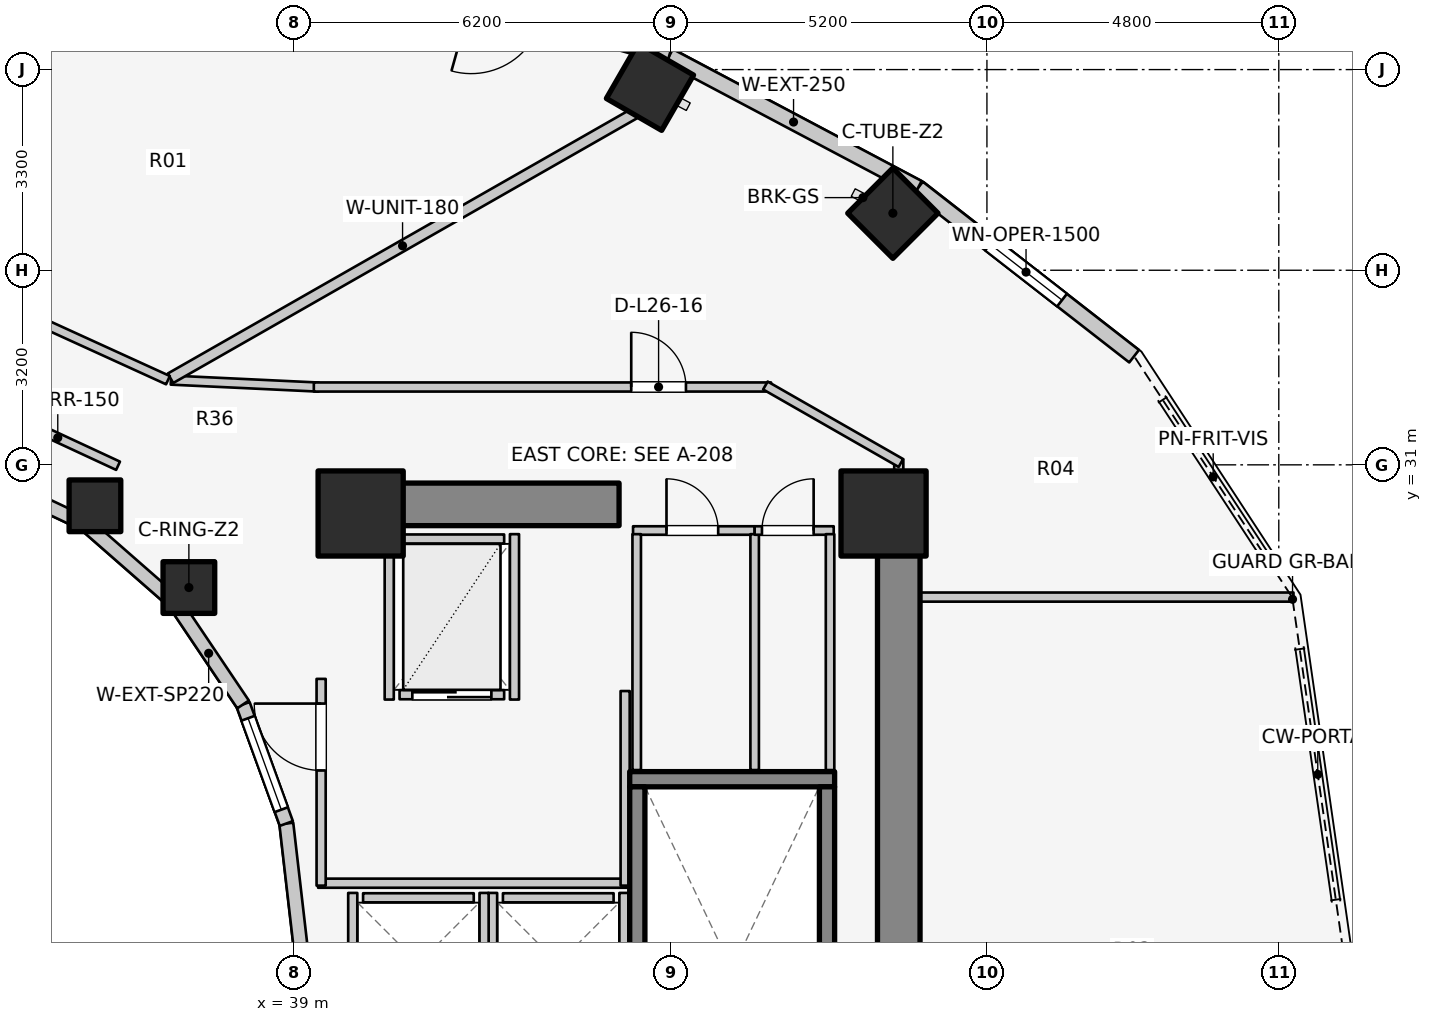
"""IFC4 building model, lengths in metres.
Left out: names, types, materials, properties, quantities, classifications, styles, units other than length and angle.
Written with IfcOpenShell. Run it as: python <this file> out.ifc"""

import sys

from ifc_helpers import new_model, si_unit, direction, frame, frame_2d, origin, origin_2d, place, context, subcontext, project, spatial, rectangle, extrude, element, fill, save


model = new_model("IFC4")
c1 = context("Model", 3, precision=1e-05, world=origin(), true_north=direction((0.0, 1.0)))
c2 = subcontext(c1, "Body", "Model", "MODEL_VIEW")
j1 = project(units=[si_unit("LENGTHUNIT", "METRE"), si_unit("PLANEANGLEUNIT", "RADIAN")], contexts=[c1])
p1 = place(None, origin())
s1 = spatial("IfcSite", under=j1, at=p1, CompositionType="ELEMENT")
p2 = place(p1, origin())
s2 = spatial("IfcBuilding", under=s1, at=p2, CompositionType="ELEMENT")
p3 = place(p2, frame((0.0, 0.0, 88.7)))
s3 = spatial("IfcBuildingStorey", under=s2, at=p3, CompositionType="ELEMENT", Elevation=88.7)
p4 = place(p3, frame((48.95, 17.05, 0.0), z_axis=(0.0, 0.0, 1.0), x_axis=(0.0, 1.0, 0.0)))
e1 = element("IfcWall", 1, at=p4, inside=s3, PredefinedType="SHEAR", context=c2, shape_type="SweptSolid", body=[
    extrude(rectangle(XDim=12.8, YDim=0.7, at=frame_2d((6.4, 0.0))), origin(), (0.0, 0.0, 1.0), 3.1),
])
p5 = place(p3, frame((39.85, 30.35, 0.0), z_axis=(0.0, 0.0, 1.0), x_axis=(1.0, 0.0, 0.0)))
e2 = element("IfcWall", 2, at=p5, inside=s3, PredefinedType="SHEAR", context=c2, shape_type="SweptSolid", body=[
    extrude(rectangle(XDim=4.5, YDim=0.7, at=frame_2d((2.25, 0.0))), origin(), (0.0, 0.0, 1.0), 3.1),
])
p6 = place(p3, frame((44.525, 25.83, 0.0), z_axis=(0.0, 0.0, 1.0), x_axis=(1.0, 0.0, 0.0)))
e3 = element("IfcWall", 3, at=p6, inside=s3, PredefinedType="SOLIDWALL", context=c2, shape_type="SweptSolid", body=[
    extrude(rectangle(XDim=3.37, YDim=0.25, at=frame_2d((1.685, 0.0))), origin(), (0.0, 0.0, 1.0), 3.1),
])
for number, where, z_axis, x_axis in (
    (4, (44.65, 17.895, 0.0), (0.0, 0.0, 1.0), (0.0, 1.0, 0.0)),
    (5, (47.77, 17.895, 0.0), (0.0, 0.0, 1.0), (0.0, 1.0, 0.0)),
):
    element("IfcWall", number, at=place(p3, frame(where, z_axis=z_axis, x_axis=x_axis)), inside=s3, PredefinedType="SOLIDWALL", context=c2, shape_type="SweptSolid", body=[
        extrude(rectangle(XDim=7.81, YDim=0.25, at=frame_2d((3.905, 0.0))), origin(), (0.0, 0.0, 1.0), 3.1),
    ])
for number, where, z_axis, x_axis in (
    (6, (48.7, 30.2, 0.0), (0.0, 0.0, 1.0), (1.0, 0.0, 0.0)),
    (7, (40.1, 30.2, 0.0), (0.0, 0.0, 1.0), (1.0, 0.0, 0.0)),
):
    element("IfcColumn", number, at=place(p3, frame(where, z_axis=z_axis, x_axis=x_axis)), inside=s3, PredefinedType="COLUMN", context=c2, shape_type="SweptSolid", body=[
        extrude(rectangle(XDim=1.4, YDim=1.4, at=origin_2d()), origin(), (0.0, 0.0, 1.0), 3.1),
    ])
p7 = place(p3, frame((37.275, 28.982, 0.0), z_axis=(0.0, 0.0, 1.0), x_axis=(1.0, 0.0, 0.0)))
e8 = element("IfcColumn", 8, at=p7, inside=s3, PredefinedType="COLUMN", context=c2, shape_type="SweptSolid", body=[
    extrude(rectangle(XDim=0.85, YDim=0.85, at=origin_2d()), origin(), (0.0, 0.0, 1.0), 3.1),
])
p8 = place(p3, frame((48.853, 35.138, 0.0), z_axis=(0.0, 0.0, 1.0), x_axis=(0.707106781187, 0.707106781187, 0.0)))
e9 = element("IfcColumn", 9, at=p8, inside=s3, PredefinedType="COLUMN", context=c2, shape_type="SweptSolid", body=[
    extrude(rectangle(XDim=1.05, YDim=1.05, at=origin_2d()), origin(), (0.0, 0.0, 1.0), 3.1),
])
p9 = place(p3, frame((35.73, 30.327, 0.0), z_axis=(0.0, 0.0, 1.0), x_axis=(1.0, 0.0, 0.0)))
e10 = element("IfcColumn", 10, at=p9, inside=s3, PredefinedType="COLUMN", context=c2, shape_type="SweptSolid", body=[
    extrude(rectangle(XDim=0.85, YDim=0.85, at=origin_2d()), origin(), (0.0, 0.0, 1.0), 3.1),
])
p10 = place(p3, frame((44.858, 37.218, 0.0), z_axis=(0.0, 0.0, 1.0), x_axis=(0.5, 0.866025403784, 0.0)))
e11 = element("IfcColumn", 11, at=p10, inside=s3, PredefinedType="COLUMN", context=c2, shape_type="SweptSolid", body=[
    extrude(rectangle(XDim=1.05, YDim=1.05, at=origin_2d()), origin(), (0.0, 0.0, 1.0), 3.1),
])
p11 = place(p3, frame((39.12, 23.0, 0.0), z_axis=(0.0, 0.0, 1.0), x_axis=(-0.114711713601, 0.993398823617, 0.0)))
e12 = element("IfcWall", 12, at=p11, inside=s3, PredefinedType="STANDARD", context=c2, shape_type="SweptSolid", body=[
    extrude(rectangle(XDim=2.115, YDim=0.23, at=frame_2d((1.058, 0.0))), origin(), (0.0, 0.0, 1.0), 2.84),
])
p12 = place(p3, frame((38.877, 25.102, 0.0), z_axis=(0.0, 0.0, 1.0), x_axis=(-0.341423187295, 0.93990968033, 0.0)))
e13 = element("IfcWall", 13, at=p12, inside=s3, PredefinedType="STANDARD", context=c2, shape_type="SweptSolid", body=[
    extrude(rectangle(XDim=2.084, YDim=0.23, at=frame_2d((1.042, 0.0))), origin(), (0.0, 0.0, 1.0), 2.84),
])
p13 = place(p12, frame((0.242, 0.0, 0.85)))
e14 = element("IfcOpeningElement", 14, at=p13, cuts=e13, PredefinedType="OPENING", context=c2, shape_type="SweptSolid", body=[
    extrude(rectangle(XDim=1.6, YDim=1.65, at=frame_2d((0.8, 0.825))), frame((0.0, 0.125, 0.0), z_axis=(0.0, -1.0, 0.0), x_axis=(1.0, 0.0, 0.0)), (0.0, 0.0, 1.0), 0.25),
])
p14 = place(p3, frame((38.166, 27.06, 0.0), z_axis=(0.0, 0.0, 1.0), x_axis=(-0.558197800898, 0.829707909492, 0.0)))
e15 = element("IfcWall", 15, at=p14, inside=s3, PredefinedType="STANDARD", context=c2, shape_type="SweptSolid", body=[
    extrude(rectangle(XDim=2.027, YDim=0.23, at=frame_2d((1.013, 0.0))), origin(), (0.0, 0.0, 1.0), 2.16),
])
p15 = place(p3, frame((37.035, 28.742, 0.0), z_axis=(0.0, 0.0, 1.0), x_axis=(-0.752576694707, 0.658504607869, 0.0)))
e16 = element("IfcWall", 16, at=p15, inside=s3, PredefinedType="STANDARD", context=c2, shape_type="SweptSolid", body=[
    extrude(rectangle(XDim=1.959, YDim=0.23, at=frame_2d((0.98, 0.0))), origin(), (0.0, 0.0, 1.0), 2.16),
])
p16 = place(p3, frame((35.56, 30.032, 0.0), z_axis=(0.0, 0.0, 1.0), x_axis=(-0.904179699603, 0.427152280606, 0.0)))
e17 = element("IfcWall", 17, at=p16, inside=s3, PredefinedType="STANDARD", context=c2, shape_type="SweptSolid", body=[
    extrude(rectangle(XDim=1.899, YDim=0.23, at=frame_2d((0.95, 0.0))), origin(), (0.0, 0.0, 1.0), 2.16),
])
p17 = place(p3, frame((52.821, 32.786, 0.0), z_axis=(0.0, 0.0, 1.0), x_axis=(-0.789127449954, 0.614229491094, 0.0)))
e18 = element("IfcWall", 18, at=p17, inside=s3, PredefinedType="STANDARD", context=c2, shape_type="SweptSolid", body=[
    extrude(rectangle(XDim=4.505, YDim=0.26, at=frame_2d((2.252, 0.0))), origin(), (0.0, 0.0, 1.0), 2.85),
])
p18 = place(p17, frame((1.502, 0.0, 0.75)))
e19 = element("IfcOpeningElement", 19, at=p18, cuts=e18, PredefinedType="OPENING", context=c2, shape_type="SweptSolid", body=[
    extrude(rectangle(XDim=1.5, YDim=1.6, at=frame_2d((0.75, 0.8))), frame((0.0, 0.14, 0.0), z_axis=(0.0, -1.0, 0.0), x_axis=(1.0, 0.0, 0.0)), (0.0, 0.0, 1.0), 0.28),
])
p19 = place(p3, frame((49.266, 35.553, 0.0), z_axis=(0.0, 0.0, 1.0), x_axis=(-0.883668636807, 0.4681129568, 0.0)))
e20 = element("IfcWall", 20, at=p19, inside=s3, PredefinedType="STANDARD", context=c2, shape_type="SweptSolid", body=[
    extrude(rectangle(XDim=4.631, YDim=0.26, at=frame_2d((2.316, 0.0))), origin(), (0.0, 0.0, 1.0), 2.85),
])
p20 = place(p3, frame((45.173, 37.721, 0.0), z_axis=(0.0, 0.0, 1.0), x_axis=(-0.962938491413, 0.269721081407, 0.0)))
e21 = element("IfcWall", 21, at=p20, inside=s3, PredefinedType="STANDARD", context=c2, shape_type="SweptSolid", body=[
    extrude(rectangle(XDim=5.563, YDim=0.26, at=frame_2d((2.782, 0.0))), origin(), (0.0, 0.0, 1.0), 2.88),
])
p21 = place(p20, frame((2.182, 0.0, 0.0)))
e22 = element("IfcOpeningElement", 22, at=p21, cuts=e21, PredefinedType="OPENING", context=c2, shape_type="SweptSolid", body=[
    extrude(rectangle(XDim=1.2, YDim=2.2, at=frame_2d((0.6, 1.1))), frame((0.0, 0.14, 0.0), z_axis=(0.0, -1.0, 0.0), x_axis=(1.0, 0.0, 0.0)), (0.0, 0.0, 1.0), 0.28),
])
p22 = place(p3, frame((42.44, 23.88, 0.0), z_axis=(0.0, 0.0, 1.0), x_axis=(1.0, 0.0, 0.0)))
e23 = element("IfcWall", 23, at=p22, inside=s3, PredefinedType="SOLIDWALL", context=c2, shape_type="SweptSolid", body=[
    extrude(rectangle(XDim=1.82, YDim=0.15, at=frame_2d((0.91, 0.0))), origin(), (0.0, 0.0, 1.0), 2.855),
])
for number, where, z_axis, x_axis in (
    (24, (42.27, 21.64, 0.0), (0.0, 0.0, 1.0), (0.0, 1.0, 0.0)),
    (25, (44.43, 21.64, 0.0), (0.0, 0.0, 1.0), (0.0, 1.0, 0.0)),
):
    element("IfcWall", number, at=place(p3, frame(where, z_axis=z_axis, x_axis=x_axis)), inside=s3, PredefinedType="SOLIDWALL", context=c2, shape_type="SweptSolid", body=[
        extrude(rectangle(XDim=2.32, YDim=0.15, at=frame_2d((1.16, 0.0))), origin(), (0.0, 0.0, 1.0), 2.855),
    ])
p23 = place(p3, frame((40.14, 23.88, 0.0), z_axis=(0.0, 0.0, 1.0), x_axis=(1.0, 0.0, 0.0)))
e26 = element("IfcWall", 26, at=p23, inside=s3, PredefinedType="SOLIDWALL", context=c2, shape_type="SweptSolid", body=[
    extrude(rectangle(XDim=1.82, YDim=0.15, at=frame_2d((0.91, 0.0))), origin(), (0.0, 0.0, 1.0), 2.12),
])
p24 = place(p3, frame((39.97, 21.64, 0.0), z_axis=(0.0, 0.0, 1.0), x_axis=(0.0, 1.0, 0.0)))
e27 = element("IfcWall", 27, at=p24, inside=s3, PredefinedType="SOLIDWALL", context=c2, shape_type="SweptSolid", body=[
    extrude(rectangle(XDim=2.32, YDim=0.15, at=frame_2d((1.16, 0.0))), origin(), (0.0, 0.0, 1.0), 2.12),
])
p25 = place(p3, frame((42.13, 21.64, 0.0), z_axis=(0.0, 0.0, 1.0), x_axis=(0.0, 1.0, 0.0)))
e28 = element("IfcWall", 28, at=p25, inside=s3, PredefinedType="SOLIDWALL", context=c2, shape_type="SweptSolid", body=[
    extrude(rectangle(XDim=2.32, YDim=0.15, at=frame_2d((1.16, 0.0))), origin(), (0.0, 0.0, 1.0), 2.855),
])
p26 = place(p3, frame((40.74, 27.22, 0.0), z_axis=(0.0, 0.0, 1.0), x_axis=(1.0, 0.0, 0.0)))
e29 = element("IfcWall", 29, at=p26, inside=s3, PredefinedType="SOLIDWALL", context=c2, shape_type="SweptSolid", body=[
    extrude(rectangle(XDim=1.72, YDim=0.15, at=frame_2d((0.86, 0.0))), origin(), (0.0, 0.0, 1.0), 2.855),
])
p27 = place(p26, frame((0.21, 0.0, 0.0)))
e30 = element("IfcOpeningElement", 30, at=p27, cuts=e29, PredefinedType="OPENING", context=c2, shape_type="SweptSolid", body=[
    extrude(rectangle(XDim=1.3, YDim=2.1, at=frame_2d((0.65, 1.05))), frame((0.0, 0.085, 0.0), z_axis=(0.0, -1.0, 0.0), x_axis=(1.0, 0.0, 0.0)), (0.0, 0.0, 1.0), 0.17),
])
p28 = place(p3, frame((40.74, 29.78, 0.0), z_axis=(0.0, 0.0, 1.0), x_axis=(1.0, 0.0, 0.0)))
e31 = element("IfcWall", 31, at=p28, inside=s3, PredefinedType="SOLIDWALL", context=c2, shape_type="SweptSolid", body=[
    extrude(rectangle(XDim=1.72, YDim=0.15, at=frame_2d((0.86, 0.0))), origin(), (0.0, 0.0, 1.0), 2.855),
])
for number, where, z_axis, x_axis in (
    (32, (40.57, 27.14, 0.0), (0.0, 0.0, 1.0), (0.0, 1.0, 0.0)),
    (33, (42.63, 27.14, 0.0), (0.0, 0.0, 1.0), (0.0, 1.0, 0.0)),
):
    element("IfcWall", number, at=place(p3, frame(where, z_axis=z_axis, x_axis=x_axis)), inside=s3, PredefinedType="SOLIDWALL", context=c2, shape_type="SweptSolid", body=[
        extrude(rectangle(XDim=2.72, YDim=0.15, at=frame_2d((1.36, 0.0))), origin(), (0.0, 0.0, 1.0), 2.855),
    ])
p29 = place(p3, frame((39.4, 24.12, 0.0), z_axis=(0.0, 0.0, 1.0), x_axis=(1.0, 0.0, 0.0)))
e34 = element("IfcWall", 34, at=p29, inside=s3, PredefinedType="PARTITIONING", context=c2, shape_type="SweptSolid", body=[
    extrude(rectangle(XDim=5.08, YDim=0.15, at=frame_2d((2.54, 0.0))), origin(), (0.0, 0.0, 1.0), 2.12),
])
p30 = place(p3, frame((44.45, 24.08, 0.0), z_axis=(0.0, 0.0, 1.0), x_axis=(0.0, 1.0, 0.0)))
e35 = element("IfcWall", 35, at=p30, inside=s3, PredefinedType="PARTITIONING", context=c2, shape_type="SweptSolid", body=[
    extrude(rectangle(XDim=3.2, YDim=0.15, at=frame_2d((1.6, 0.0))), origin(), (0.0, 0.0, 1.0), 2.855),
])
p31 = place(p3, frame((39.45, 24.08, 0.0), z_axis=(0.0, 0.0, 1.0), x_axis=(0.0, 1.0, 0.0)))
e36 = element("IfcWall", 36, at=p31, inside=s3, PredefinedType="PARTITIONING", context=c2, shape_type="SweptSolid", body=[
    extrude(rectangle(XDim=3.4, YDim=0.15, at=frame_2d((1.7, 0.0))), origin(), (0.0, 0.0, 1.0), 2.855),
])
p32 = place(p31, frame((1.894, 0.0, 0.0)))
e37 = element("IfcOpeningElement", 37, at=p32, cuts=e36, PredefinedType="OPENING", context=c2, shape_type="SweptSolid", body=[
    extrude(rectangle(XDim=1.1, YDim=2.1, at=frame_2d((0.55, 1.05))), frame((0.0, 0.085, 0.0), z_axis=(0.0, -1.0, 0.0), x_axis=(1.0, 0.0, 0.0)), (0.0, 0.0, 1.0), 0.17),
])
p33 = place(p3, frame((44.58, 29.92, 0.0), z_axis=(0.0, 0.0, 1.0), x_axis=(1.0, 0.0, 0.0)))
e38 = element("IfcWall", 38, at=p33, inside=s3, PredefinedType="PLUMBINGWALL", context=c2, shape_type="SweptSolid", body=[
    extrude(rectangle(XDim=2.0, YDim=0.14, at=frame_2d((1.0, 0.0))), origin(), (0.0, 0.0, 1.0), 2.855),
])
p34 = place(p33, frame((0.55, 0.0, 0.0)))
e39 = element("IfcOpeningElement", 39, at=p34, cuts=e38, PredefinedType="OPENING", context=c2, shape_type="SweptSolid", body=[
    extrude(rectangle(XDim=0.85, YDim=2.05, at=frame_2d((0.425, 1.025))), frame((0.0, 0.08, 0.0), z_axis=(0.0, -1.0, 0.0), x_axis=(1.0, 0.0, 0.0)), (0.0, 0.0, 1.0), 0.16),
])
for number, where, z_axis, x_axis in (
    (40, (44.64, 25.98, 0.0), (0.0, 0.0, 1.0), (0.0, 1.0, 0.0)),
    (41, (46.58, 25.98, 0.0), (0.0, 0.0, 1.0), (0.0, 1.0, 0.0)),
):
    element("IfcWall", number, at=place(p3, frame(where, z_axis=z_axis, x_axis=x_axis)), inside=s3, PredefinedType="PLUMBINGWALL", context=c2, shape_type="SweptSolid", body=[
        extrude(rectangle(XDim=3.88, YDim=0.14, at=frame_2d((1.94, 0.0))), origin(), (0.0, 0.0, 1.0), 2.855),
    ])
p35 = place(p3, frame((46.58, 29.92, 0.0), z_axis=(0.0, 0.0, 1.0), x_axis=(1.0, 0.0, 0.0)))
e42 = element("IfcWall", 42, at=p35, inside=s3, PredefinedType="PLUMBINGWALL", context=c2, shape_type="SweptSolid", body=[
    extrude(rectangle(XDim=1.3, YDim=0.14, at=frame_2d((0.65, 0.0))), origin(), (0.0, 0.0, 1.0), 2.855),
])
p36 = place(p35, frame((0.12, 0.0, 0.0)))
e43 = element("IfcOpeningElement", 43, at=p36, cuts=e42, PredefinedType="OPENING", context=c2, shape_type="SweptSolid", body=[
    extrude(rectangle(XDim=0.85, YDim=2.05, at=frame_2d((0.425, 1.025))), frame((0.0, 0.08, 0.0), z_axis=(0.0, -1.0, 0.0), x_axis=(1.0, 0.0, 0.0)), (0.0, 0.0, 1.0), 0.16),
])
p37 = place(p3, frame((47.82, 25.98, 0.0), z_axis=(0.0, 0.0, 1.0), x_axis=(0.0, 1.0, 0.0)))
e44 = element("IfcWall", 44, at=p37, inside=s3, PredefinedType="PLUMBINGWALL", context=c2, shape_type="SweptSolid", body=[
    extrude(rectangle(XDim=3.88, YDim=0.14, at=frame_2d((1.94, 0.0))), origin(), (0.0, 0.0, 1.0), 2.855),
])
p38 = place(p3, frame((36.11, 30.985, 0.0), z_axis=(0.0, 0.0, 1.0), x_axis=(-0.906943449489, 0.421252393975, 0.0)))
e45 = element("IfcWall", 45, at=p38, inside=s3, PredefinedType="PARTITIONING", context=c2, shape_type="SweptSolid", body=[
    extrude(rectangle(XDim=2.186, YDim=0.15, at=frame_2d((1.093, 0.0))), origin(), (0.0, 0.0, 1.0), 2.272),
])
p39 = place(p3, frame((48.95, 28.825, 0.0), z_axis=(0.0, 0.0, 1.0), x_axis=(1.0, 0.0, 0.0)))
e46 = element("IfcWall", 46, at=p39, inside=s3, PredefinedType="PARTITIONING", context=c2, shape_type="SweptSolid", body=[
    extrude(rectangle(XDim=6.492, YDim=0.15, at=frame_2d((3.246, 0.0))), origin(), (0.0, 0.0, 1.0), 2.855),
])
p40 = place(p3, frame((48.95, 29.8, 0.0), z_axis=(0.0, 0.0, 1.0), x_axis=(0.0, 1.0, 0.0)))
e47 = element("IfcWall", 47, at=p40, inside=s3, PredefinedType="PARTITIONING", context=c2, shape_type="SweptSolid", body=[
    extrude(rectangle(XDim=1.29, YDim=0.15, at=frame_2d((0.645, 0.0))), origin(), (0.0, 0.0, 1.0), 2.142),
])
p41 = place(p3, frame((36.98, 32.394, 0.0), z_axis=(0.0, 0.0, 1.0), x_axis=(0.998877427952, -0.047369651964, 0.0)))
e48 = element("IfcWall", 48, at=p41, inside=s3, PredefinedType="PARTITIONING", context=c2, shape_type="SweptSolid", body=[
    extrude(rectangle(XDim=2.433, YDim=0.15, at=frame_2d((1.216, 0.0))), origin(), (0.0, 0.0, 1.0), 2.272),
])
p42 = place(p3, frame((39.33, 32.28, 0.0), z_axis=(0.0, 0.0, 1.0), x_axis=(1.0, 0.0, 0.0)))
e49 = element("IfcWall", 49, at=p42, inside=s3, PredefinedType="PARTITIONING", context=c2, shape_type="SweptSolid", body=[
    extrude(rectangle(XDim=7.52, YDim=0.15, at=frame_2d((3.76, 0.0))), origin(), (0.0, 0.0, 1.0), 2.272),
])
p43 = place(p42, frame((5.22, 0.0, 0.0)))
e50 = element("IfcOpeningElement", 50, at=p43, cuts=e49, PredefinedType="OPENING", context=c2, shape_type="SweptSolid", body=[
    extrude(rectangle(XDim=0.9, YDim=2.1, at=frame_2d((0.45, 1.05))), frame((0.0, 0.085, 0.0), z_axis=(0.0, -1.0, 0.0), x_axis=(1.0, 0.0, 0.0)), (0.0, 0.0, 1.0), 0.17),
])
p44 = place(p3, frame((46.757, 32.305, 0.0), z_axis=(0.0, 0.0, 1.0), x_axis=(0.867991349648, -0.496579315857, 0.0)))
e51 = element("IfcWall", 51, at=p44, inside=s3, PredefinedType="PARTITIONING", context=c2, shape_type="SweptSolid", body=[
    extrude(rectangle(XDim=2.567, YDim=0.15, at=frame_2d((1.283, 0.0))), origin(), (0.0, 0.0, 1.0), 2.142),
])
p45 = place(p3, frame((36.973, 32.424, 0.0), z_axis=(0.0, 0.0, 1.0), x_axis=(0.868484076301, 0.495717065685, 0.0)))
e52 = element("IfcWall", 52, at=p45, inside=s3, PredefinedType="PARTITIONING", context=c2, shape_type="SweptSolid", body=[
    extrude(rectangle(XDim=8.789, YDim=0.18, at=frame_2d((4.394, 0.0))), origin(), (0.0, 0.0, 1.0), 2.272),
])
p46 = place(p3, frame((36.931, 32.393, 0.0), z_axis=(0.0, 0.0, 1.0), x_axis=(-0.909747571199, 0.415161843982, 0.0)))
e53 = element("IfcWall", 53, at=p46, inside=s3, PredefinedType="PARTITIONING", context=c2, shape_type="SweptSolid", body=[
    extrude(rectangle(XDim=2.625, YDim=0.15, at=frame_2d((1.312, 0.0))), origin(), (0.0, 0.0, 1.0), 2.272),
])
p47 = place(p13, origin())
e54 = element("IfcWindow", 54, at=p47, inside=s3, PartitioningType="SINGLE_PANEL", PredefinedType="WINDOW", context=c2, shape_type="SweptSolid", body=[
    extrude(rectangle(XDim=1.6, YDim=1.65, at=frame_2d((0.8, 0.825))), frame((0.0, 0.03, 0.0), z_axis=(0.0, -1.0, 0.0), x_axis=(1.0, 0.0, 0.0)), (0.0, 0.0, 1.0), 0.06),
])
fill(e14, e54)
p48 = place(p18, origin())
e55 = element("IfcWindow", 55, at=p48, inside=s3, PartitioningType="SINGLE_PANEL", PredefinedType="WINDOW", context=c2, shape_type="SweptSolid", body=[
    extrude(rectangle(XDim=1.5, YDim=1.6, at=frame_2d((0.75, 0.8))), frame((0.0, 0.03, 0.0), z_axis=(0.0, -1.0, 0.0), x_axis=(1.0, 0.0, 0.0)), (0.0, 0.0, 1.0), 0.06),
])
fill(e19, e55)
p49 = place(p27, origin())
e56 = element("IfcDoor", 56, at=p49, inside=s3, OperationType="DOUBLE_DOOR_SLIDING", PredefinedType="DOOR", context=c2, shape_type="SweptSolid", body=[
    extrude(rectangle(XDim=1.3, YDim=2.1, at=frame_2d((0.65, 1.05))), frame((0.0, 0.025, 0.0), z_axis=(0.0, -1.0, 0.0), x_axis=(1.0, 0.0, 0.0)), (0.0, 0.0, 1.0), 0.05),
])
fill(e30, e56)
p50 = place(p32, origin())
e57 = element("IfcDoor", 57, at=p50, inside=s3, OperationType="SINGLE_SWING_RIGHT", PredefinedType="DOOR", context=c2, shape_type="SweptSolid", body=[
    extrude(rectangle(XDim=1.1, YDim=2.1, at=frame_2d((0.55, 1.05))), frame((0.0, 0.025, 0.0), z_axis=(0.0, -1.0, 0.0), x_axis=(1.0, 0.0, 0.0)), (0.0, 0.0, 1.0), 0.05),
])
fill(e37, e57)
p51 = place(p34, origin())
e58 = element("IfcDoor", 58, at=p51, inside=s3, OperationType="SINGLE_SWING_LEFT", PredefinedType="DOOR", context=c2, shape_type="SweptSolid", body=[
    extrude(rectangle(XDim=0.85, YDim=2.05, at=frame_2d((0.425, 1.025))), frame((0.0, 0.025, 0.0), z_axis=(0.0, -1.0, 0.0), x_axis=(1.0, 0.0, 0.0)), (0.0, 0.0, 1.0), 0.05),
])
fill(e39, e58)
p52 = place(p36, origin())
e59 = element("IfcDoor", 59, at=p52, inside=s3, OperationType="SINGLE_SWING_RIGHT", PredefinedType="DOOR", context=c2, shape_type="SweptSolid", body=[
    extrude(rectangle(XDim=0.85, YDim=2.05, at=frame_2d((0.425, 1.025))), frame((0.0, 0.025, 0.0), z_axis=(0.0, -1.0, 0.0), x_axis=(1.0, 0.0, 0.0)), (0.0, 0.0, 1.0), 0.05),
])
fill(e43, e59)
p53 = place(p43, origin())
e60 = element("IfcDoor", 60, at=p53, inside=s3, OperationType="SINGLE_SWING_LEFT", PredefinedType="DOOR", context=c2, shape_type="SweptSolid", body=[
    extrude(rectangle(XDim=0.9, YDim=2.1, at=frame_2d((0.45, 1.05))), frame((0.0, 0.025, 0.0), z_axis=(0.0, -1.0, 0.0), x_axis=(1.0, 0.0, 0.0)), (0.0, 0.0, 1.0), 0.05),
])
fill(e50, e60)
save(model, sys.argv[1])
